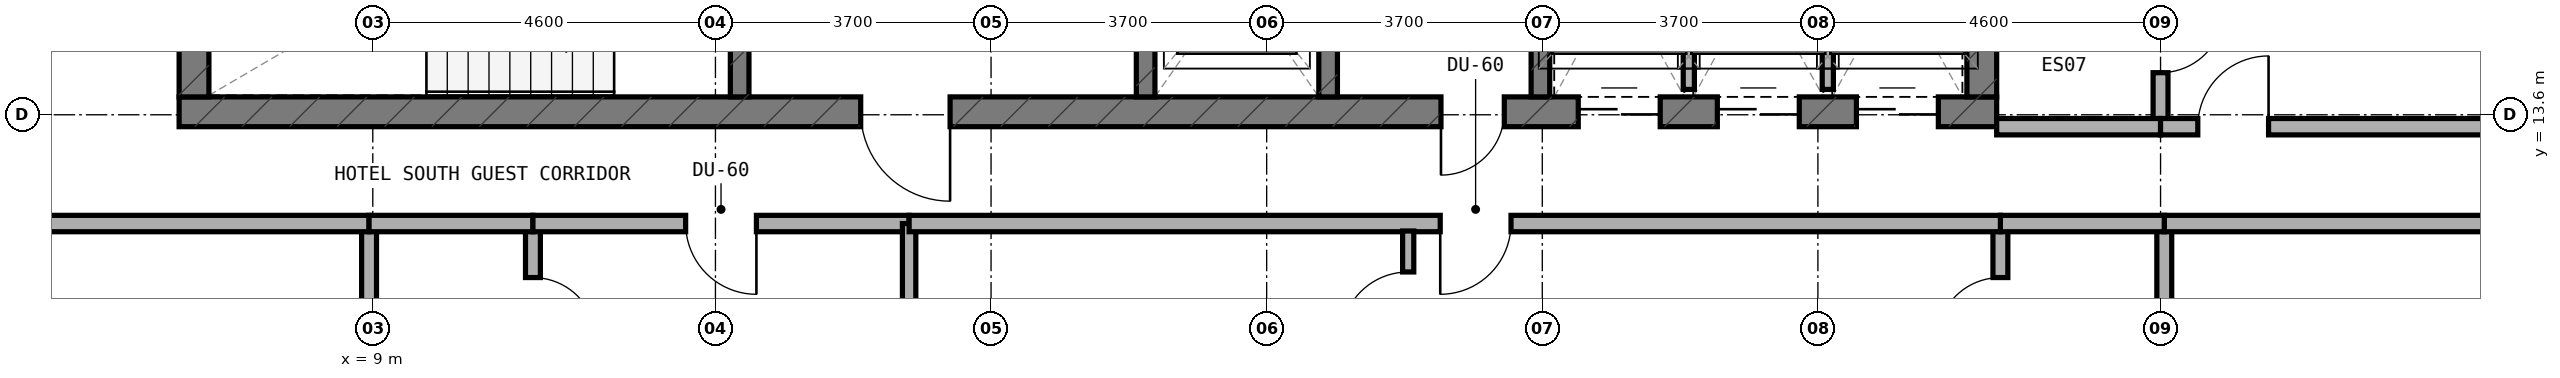
"""IFC4 building model, lengths in metres.
Left out: names, types, materials, properties, quantities, classifications, styles, units other than length and angle.
Written with IfcOpenShell. Run it as: python <this file> out.ifc"""

import sys

from ifc_helpers import new_model, si_unit, direction, frame, frame_2d, origin, place, context, subcontext, project, spatial, rectangle, extrude, element, fill, save


model = new_model("IFC4")
c1 = context("Model", 3, precision=1e-05, world=origin(), true_north=direction((0.0, 1.0)))
c2 = subcontext(c1, "Body", "Model", "MODEL_VIEW")
j1 = project(units=[si_unit("LENGTHUNIT", "METRE"), si_unit("PLANEANGLEUNIT", "RADIAN")], contexts=[c1])
p1 = place(None, origin())
s1 = spatial("IfcSite", under=j1, at=p1, CompositionType="ELEMENT")
p2 = place(p1, origin())
s2 = spatial("IfcBuilding", under=s1, at=p2, CompositionType="ELEMENT")
p3 = place(p2, frame((0.0, 0.0, 243.2)))
s3 = spatial("IfcBuildingStorey", under=s2, at=p3, CompositionType="ELEMENT", Elevation=243.2)
p4 = place(p3, frame((6.4, 13.64, 0.0), z_axis=(0.0, 0.0, 1.0), x_axis=(1.0, 0.0, 0.0)))
e1 = element("IfcWall", 1, at=p4, inside=s3, PredefinedType="SHEAR", context=c2, shape_type="SweptSolid", body=[
    extrude(rectangle(XDim=24.4, YDim=0.4, at=frame_2d((12.2, 0.0))), origin(), (0.0, 0.0, 1.0), 3.6),
])
p5 = place(p4, frame((9.15, 0.0, 0.0)))
e2 = element("IfcOpeningElement", 2, at=p5, cuts=e1, PredefinedType="OPENING", context=c2, shape_type="SweptSolid", body=[
    extrude(rectangle(XDim=1.2, YDim=2.15, at=frame_2d((0.6, 1.075))), frame((0.0, 0.21, 0.0), z_axis=(0.0, -1.0, 0.0), x_axis=(1.0, 0.0, 0.0)), (0.0, 0.0, 1.0), 0.42),
])
p6 = place(p4, frame((16.94, 0.0, 0.0)))
e3 = element("IfcOpeningElement", 3, at=p6, cuts=e1, PredefinedType="OPENING", context=c2, shape_type="SweptSolid", body=[
    extrude(rectangle(XDim=0.85, YDim=2.1, at=frame_2d((0.425, 1.05))), frame((0.0, 0.21, 0.0), z_axis=(0.0, -1.0, 0.0), x_axis=(1.0, 0.0, 0.0)), (0.0, 0.0, 1.0), 0.42),
])
p7 = place(p4, frame((18.783, 0.0, 0.0)))
e4 = element("IfcOpeningElement", 4, at=p7, cuts=e1, PredefinedType="OPENING", context=c2, shape_type="SweptSolid", body=[
    extrude(rectangle(XDim=1.1, YDim=2.15, at=frame_2d((0.55, 1.075))), frame((0.0, 0.21, 0.0), z_axis=(0.0, -1.0, 0.0), x_axis=(1.0, 0.0, 0.0)), (0.0, 0.0, 1.0), 0.42),
])
p8 = place(p4, frame((20.65, 0.0, 0.0)))
e5 = element("IfcOpeningElement", 5, at=p8, cuts=e1, PredefinedType="OPENING", context=c2, shape_type="SweptSolid", body=[
    extrude(rectangle(XDim=1.1, YDim=2.15, at=frame_2d((0.55, 1.075))), frame((0.0, 0.21, 0.0), z_axis=(0.0, -1.0, 0.0), x_axis=(1.0, 0.0, 0.0)), (0.0, 0.0, 1.0), 0.42),
])
p9 = place(p4, frame((22.517, 0.0, 0.0)))
e6 = element("IfcOpeningElement", 6, at=p9, cuts=e1, PredefinedType="OPENING", context=c2, shape_type="SweptSolid", body=[
    extrude(rectangle(XDim=1.1, YDim=2.15, at=frame_2d((0.55, 1.075))), frame((0.0, 0.21, 0.0), z_axis=(0.0, -1.0, 0.0), x_axis=(1.0, 0.0, 0.0)), (0.0, 0.0, 1.0), 0.42),
])
for number, where, z_axis, x_axis in (
    (7, (6.6, 13.84, 0.0), (0.0, 0.0, 1.0), (0.0, 1.0, 0.0)),
    (8, (30.6, 13.84, 0.0), (0.0, 0.0, 1.0), (0.0, 1.0, 0.0)),
):
    element("IfcWall", number, at=place(p3, frame(where, z_axis=z_axis, x_axis=x_axis)), inside=s3, PredefinedType="SHEAR", context=c2, shape_type="SweptSolid", body=[
        extrude(rectangle(XDim=3.16, YDim=0.4, at=frame_2d((1.58, 0.0))), origin(), (0.0, 0.0, 1.0), 3.6),
    ])
p10 = place(p3, frame((13.925, 13.84, 0.0), z_axis=(0.0, 0.0, 1.0), x_axis=(0.0, 1.0, 0.0)))
e9 = element("IfcWall", 9, at=p10, inside=s3, PredefinedType="STANDARD", context=c2, shape_type="SweptSolid", body=[
    extrude(rectangle(XDim=3.16, YDim=0.25, at=frame_2d((1.58, 0.0))), origin(), (0.0, 0.0, 1.0), 3.32),
])
p11 = place(p10, frame((0.98, 0.0, 0.0)))
e10 = element("IfcOpeningElement", 10, at=p11, cuts=e9, PredefinedType="OPENING", context=c2, shape_type="SweptSolid", body=[
    extrude(rectangle(XDim=1.1, YDim=2.15, at=frame_2d((0.55, 1.075))), frame((0.0, 0.135, 0.0), z_axis=(0.0, -1.0, 0.0), x_axis=(1.0, 0.0, 0.0)), (0.0, 0.0, 1.0), 0.27),
])
p12 = place(p3, frame((19.375, 13.84, 0.0), z_axis=(0.0, 0.0, 1.0), x_axis=(0.0, 1.0, 0.0)))
e11 = element("IfcWall", 11, at=p12, inside=s3, PredefinedType="STANDARD", context=c2, shape_type="SweptSolid", body=[
    extrude(rectangle(XDim=3.16, YDim=0.25, at=frame_2d((1.58, 0.0))), origin(), (0.0, 0.0, 1.0), 3.32),
])
p13 = place(p12, frame((0.98, 0.0, 0.0)))
e12 = element("IfcOpeningElement", 12, at=p13, cuts=e11, PredefinedType="OPENING", context=c2, shape_type="SweptSolid", body=[
    extrude(rectangle(XDim=1.1, YDim=2.15, at=frame_2d((0.55, 1.075))), frame((0.0, 0.135, 0.0), z_axis=(0.0, -1.0, 0.0), x_axis=(1.0, 0.0, 0.0)), (0.0, 0.0, 1.0), 0.27),
])
for number, where, z_axis, x_axis in (
    (13, (21.825, 13.84, 0.0), (0.0, 0.0, 1.0), (0.0, 1.0, 0.0)),
    (14, (24.675, 13.84, 0.0), (0.0, 0.0, 1.0), (0.0, 1.0, 0.0)),
):
    element("IfcWall", number, at=place(p3, frame(where, z_axis=z_axis, x_axis=x_axis)), inside=s3, PredefinedType="STANDARD", context=c2, shape_type="SweptSolid", body=[
        extrude(rectangle(XDim=3.16, YDim=0.25, at=frame_2d((1.58, 0.0))), origin(), (0.0, 0.0, 1.0), 3.32),
    ])
p14 = place(p3, frame((26.667, 13.94, 0.0), z_axis=(0.0, 0.0, 1.0), x_axis=(0.0, 1.0, 0.0)))
e15 = element("IfcWall", 15, at=p14, inside=s3, PredefinedType="PARTITIONING", context=c2, shape_type="SweptSolid", body=[
    extrude(rectangle(XDim=2.96, YDim=0.15, at=frame_2d((1.48, 0.0))), origin(), (0.0, 0.0, 1.0), 3.32),
])
p15 = place(p3, frame((28.533, 13.94, 0.0), z_axis=(0.0, 0.0, 1.0), x_axis=(0.0, 1.0, 0.0)))
e16 = element("IfcWall", 16, at=p15, inside=s3, PredefinedType="PARTITIONING", context=c2, shape_type="SweptSolid", body=[
    extrude(rectangle(XDim=2.96, YDim=0.15, at=frame_2d((1.48, 0.0))), origin(), (0.0, 0.0, 1.0), 2.745),
])
p16 = place(p3, frame((11.15, 9.94, 0.0), z_axis=(0.0, 0.0, 1.0), x_axis=(0.0, 1.0, 0.0)))
e17 = element("IfcWall", 17, at=p16, inside=s3, PredefinedType="PLUMBINGWALL", context=c2, shape_type="SweptSolid", body=[
    extrude(rectangle(XDim=2.1, YDim=0.2, at=frame_2d((1.05, 0.0))), origin(), (0.0, 0.0, 1.0), 2.995),
])
p17 = place(p16, frame((0.625, 0.0, 0.0)))
e18 = element("IfcOpeningElement", 18, at=p17, cuts=e17, PredefinedType="OPENING", context=c2, shape_type="SweptSolid", body=[
    extrude(rectangle(XDim=0.85, YDim=2.1, at=frame_2d((0.425, 1.05))), frame((0.0, 0.11, 0.0), z_axis=(0.0, -1.0, 0.0), x_axis=(1.0, 0.0, 0.0)), (0.0, 0.0, 1.0), 0.22),
])
p18 = place(p3, frame((8.95, 9.94, 0.0), z_axis=(0.0, 0.0, 1.0), x_axis=(0.0, 1.0, 0.0)))
e19 = element("IfcWall", 19, at=p18, inside=s3, PredefinedType="PLUMBINGWALL", context=c2, shape_type="SweptSolid", body=[
    extrude(rectangle(XDim=2.1, YDim=0.2, at=frame_2d((1.05, 0.0))), origin(), (0.0, 0.0, 1.0), 2.995),
])
p19 = place(p3, frame((2.76, 12.14, 0.0), z_axis=(0.0, 0.0, 1.0), x_axis=(1.0, 0.0, 0.0)))
e20 = element("IfcWall", 20, at=p19, inside=s3, PredefinedType="SOLIDWALL", context=c2, shape_type="SweptSolid", body=[
    extrude(rectangle(XDim=6.19, YDim=0.22, at=frame_2d((3.095, 0.0))), origin(), (0.0, 0.0, 1.0), 2.745),
])
p20 = place(p3, frame((8.95, 12.14, 0.0), z_axis=(0.0, 0.0, 1.0), x_axis=(1.0, 0.0, 0.0)))
e21 = element("IfcWall", 21, at=p20, inside=s3, PredefinedType="SOLIDWALL", context=c2, shape_type="SweptSolid", body=[
    extrude(rectangle(XDim=2.2, YDim=0.22, at=frame_2d((1.1, 0.0))), origin(), (0.0, 0.0, 1.0), 3.32),
])
p21 = place(p3, frame((11.15, 12.14, 0.0), z_axis=(0.0, 0.0, 1.0), x_axis=(1.0, 0.0, 0.0)))
e22 = element("IfcWall", 22, at=p21, inside=s3, PredefinedType="SOLIDWALL", context=c2, shape_type="SweptSolid", body=[
    extrude(rectangle(XDim=5.05, YDim=0.22, at=frame_2d((2.525, 0.0))), origin(), (0.0, 0.0, 1.0), 2.745),
])
p22 = place(p21, frame((2.05, 0.0, 0.0)))
e23 = element("IfcOpeningElement", 23, at=p22, cuts=e22, PredefinedType="OPENING", context=c2, shape_type="SweptSolid", body=[
    extrude(rectangle(XDim=0.95, YDim=2.1, at=frame_2d((0.475, 1.05))), frame((0.0, 0.12, 0.0), z_axis=(0.0, -1.0, 0.0), x_axis=(1.0, 0.0, 0.0)), (0.0, 0.0, 1.0), 0.24),
])
p23 = place(p3, frame((16.2, 6.46, 0.0), z_axis=(0.0, 0.0, 1.0), x_axis=(0.0, 1.0, 0.0)))
e24 = element("IfcWall", 24, at=p23, inside=s3, PredefinedType="SOLIDWALL", context=c2, shape_type="SweptSolid", body=[
    extrude(rectangle(XDim=5.68, YDim=0.18, at=frame_2d((2.84, 0.0))), origin(), (0.0, 0.0, 1.0), 2.745),
])
p24 = place(p3, frame((30.85, 9.94, 0.0), z_axis=(0.0, 0.0, 1.0), x_axis=(0.0, 1.0, 0.0)))
e25 = element("IfcWall", 25, at=p24, inside=s3, PredefinedType="PLUMBINGWALL", context=c2, shape_type="SweptSolid", body=[
    extrude(rectangle(XDim=2.1, YDim=0.2, at=frame_2d((1.05, 0.0))), origin(), (0.0, 0.0, 1.0), 2.995),
])
p25 = place(p24, frame((0.625, 0.0, 0.0)))
e26 = element("IfcOpeningElement", 26, at=p25, cuts=e25, PredefinedType="OPENING", context=c2, shape_type="SweptSolid", body=[
    extrude(rectangle(XDim=0.85, YDim=2.1, at=frame_2d((0.425, 1.05))), frame((0.0, 0.11, 0.0), z_axis=(0.0, -1.0, 0.0), x_axis=(1.0, 0.0, 0.0)), (0.0, 0.0, 1.0), 0.22),
])
p26 = place(p3, frame((33.05, 9.94, 0.0), z_axis=(0.0, 0.0, 1.0), x_axis=(0.0, 1.0, 0.0)))
e27 = element("IfcWall", 27, at=p26, inside=s3, PredefinedType="PLUMBINGWALL", context=c2, shape_type="SweptSolid", body=[
    extrude(rectangle(XDim=2.1, YDim=0.2, at=frame_2d((1.05, 0.0))), origin(), (0.0, 0.0, 1.0), 2.995),
])
p27 = place(p3, frame((33.05, 12.14, 0.0), z_axis=(0.0, 0.0, 1.0), x_axis=(1.0, 0.0, 0.0)))
e28 = element("IfcWall", 28, at=p27, inside=s3, PredefinedType="SOLIDWALL", context=c2, shape_type="SweptSolid", body=[
    extrude(rectangle(XDim=6.19, YDim=0.22, at=frame_2d((3.095, 0.0))), origin(), (0.0, 0.0, 1.0), 2.745),
])
p28 = place(p3, frame((30.85, 12.14, 0.0), z_axis=(0.0, 0.0, 1.0), x_axis=(1.0, 0.0, 0.0)))
e29 = element("IfcWall", 29, at=p28, inside=s3, PredefinedType="SOLIDWALL", context=c2, shape_type="SweptSolid", body=[
    extrude(rectangle(XDim=2.2, YDim=0.22, at=frame_2d((1.1, 0.0))), origin(), (0.0, 0.0, 1.0), 3.32),
])
p29 = place(p3, frame((16.2, 12.14, 0.0), z_axis=(0.0, 0.0, 1.0), x_axis=(1.0, 0.0, 0.0)))
e30 = element("IfcWall", 30, at=p29, inside=s3, PredefinedType="SOLIDWALL", context=c2, shape_type="SweptSolid", body=[
    extrude(rectangle(XDim=14.65, YDim=0.22, at=frame_2d((7.325, 0.0))), origin(), (0.0, 0.0, 1.0), 2.745),
])
p30 = place(p29, frame((7.13, 0.0, 0.0)))
e31 = element("IfcOpeningElement", 31, at=p30, cuts=e30, PredefinedType="OPENING", context=c2, shape_type="SweptSolid", body=[
    extrude(rectangle(XDim=0.95, YDim=2.1, at=frame_2d((0.475, 1.05))), frame((0.0, 0.12, 0.0), z_axis=(0.0, -1.0, 0.0), x_axis=(1.0, 0.0, 0.0)), (0.0, 0.0, 1.0), 0.24),
])
p31 = place(p3, frame((22.9, 6.56, 0.0), z_axis=(0.0, 0.0, 1.0), x_axis=(0.0, 1.0, 0.0)))
e32 = element("IfcWall", 32, at=p31, inside=s3, PredefinedType="PARTITIONING", context=c2, shape_type="SweptSolid", body=[
    extrude(rectangle(XDim=5.48, YDim=0.15, at=frame_2d((2.74, 0.0))), origin(), (0.0, 0.0, 1.0), 2.995),
])
p32 = place(p31, frame((4.03, 0.0, 0.0)))
e33 = element("IfcOpeningElement", 33, at=p32, cuts=e32, PredefinedType="OPENING", context=c2, shape_type="SweptSolid", body=[
    extrude(rectangle(XDim=0.9, YDim=2.1, at=frame_2d((0.45, 1.05))), frame((0.0, 0.085, 0.0), z_axis=(0.0, -1.0, 0.0), x_axis=(1.0, 0.0, 0.0)), (0.0, 0.0, 1.0), 0.17),
])
p33 = place(p3, frame((33.0, 13.54, 0.0), z_axis=(0.0, 0.0, 1.0), x_axis=(0.0, 1.0, 0.0)))
e34 = element("IfcWall", 34, at=p33, inside=s3, PredefinedType="PLUMBINGWALL", context=c2, shape_type="SweptSolid", body=[
    extrude(rectangle(XDim=2.1, YDim=0.2, at=frame_2d((1.05, 0.0))), origin(), (0.0, 0.0, 1.0), 3.32),
])
p34 = place(p33, frame((0.625, 0.0, 0.0)))
e35 = element("IfcOpeningElement", 35, at=p34, cuts=e34, PredefinedType="OPENING", context=c2, shape_type="SweptSolid", body=[
    extrude(rectangle(XDim=0.85, YDim=2.1, at=frame_2d((0.425, 1.05))), frame((0.0, 0.11, 0.0), z_axis=(0.0, -1.0, 0.0), x_axis=(1.0, 0.0, 0.0)), (0.0, 0.0, 1.0), 0.22),
])
p35 = place(p3, frame((30.8, 13.44, 0.0), z_axis=(0.0, 0.0, 1.0), x_axis=(1.0, 0.0, 0.0)))
e36 = element("IfcWall", 36, at=p35, inside=s3, PredefinedType="SOLIDWALL", context=c2, shape_type="SweptSolid", body=[
    extrude(rectangle(XDim=2.2, YDim=0.22, at=frame_2d((1.1, 0.0))), origin(), (0.0, 0.0, 1.0), 3.32),
])
p36 = place(p3, frame((33.0, 13.44, 0.0), z_axis=(0.0, 0.0, 1.0), x_axis=(1.0, 0.0, 0.0)))
e37 = element("IfcWall", 37, at=p36, inside=s3, PredefinedType="SOLIDWALL", context=c2, shape_type="SweptSolid", body=[
    extrude(rectangle(XDim=6.4, YDim=0.22, at=frame_2d((3.2, 0.0))), origin(), (0.0, 0.0, 1.0), 2.745),
])
p37 = place(p36, frame((0.5, 0.0, 0.0)))
e38 = element("IfcOpeningElement", 38, at=p37, cuts=e37, PredefinedType="OPENING", context=c2, shape_type="SweptSolid", body=[
    extrude(rectangle(XDim=0.95, YDim=2.1, at=frame_2d((0.475, 1.05))), frame((0.0, 0.12, 0.0), z_axis=(0.0, -1.0, 0.0), x_axis=(1.0, 0.0, 0.0)), (0.0, 0.0, 1.0), 0.24),
])
p38 = place(p5, frame((1.2, 0.0, 0.0), z_axis=(0.0, 0.0, 1.0), x_axis=(-1.0, 0.0, 0.0)))
e39 = element("IfcDoor", 39, at=p38, inside=s3, OperationType="SINGLE_SWING_LEFT", PredefinedType="DOOR", context=c2, shape_type="SweptSolid", body=[
    extrude(rectangle(XDim=1.2, YDim=2.15, at=frame_2d((0.6, 1.075))), frame((0.0, 0.025, 0.0), z_axis=(0.0, -1.0, 0.0), x_axis=(1.0, 0.0, 0.0)), (0.0, 0.0, 1.0), 0.05),
])
fill(e2, e39)
p39 = place(p6, frame((0.85, 0.0, 0.0), z_axis=(0.0, 0.0, 1.0), x_axis=(-1.0, 0.0, 0.0)))
e40 = element("IfcDoor", 40, at=p39, inside=s3, OperationType="SINGLE_SWING_RIGHT", PredefinedType="DOOR", context=c2, shape_type="SweptSolid", body=[
    extrude(rectangle(XDim=0.85, YDim=2.1, at=frame_2d((0.425, 1.05))), frame((0.0, 0.025, 0.0), z_axis=(0.0, -1.0, 0.0), x_axis=(1.0, 0.0, 0.0)), (0.0, 0.0, 1.0), 0.05),
])
fill(e3, e40)
p40 = place(p7, frame((1.1, 0.0, 0.0), z_axis=(0.0, 0.0, 1.0), x_axis=(-1.0, 0.0, 0.0)))
e41 = element("IfcDoor", 41, at=p40, inside=s3, OperationType="DOUBLE_DOOR_SLIDING", PredefinedType="DOOR", context=c2, shape_type="SweptSolid", body=[
    extrude(rectangle(XDim=1.1, YDim=2.15, at=frame_2d((0.55, 1.075))), frame((0.0, 0.025, 0.0), z_axis=(0.0, -1.0, 0.0), x_axis=(1.0, 0.0, 0.0)), (0.0, 0.0, 1.0), 0.05),
])
fill(e4, e41)
p41 = place(p8, frame((1.1, 0.0, 0.0), z_axis=(0.0, 0.0, 1.0), x_axis=(-1.0, 0.0, 0.0)))
e42 = element("IfcDoor", 42, at=p41, inside=s3, OperationType="DOUBLE_DOOR_SLIDING", PredefinedType="DOOR", context=c2, shape_type="SweptSolid", body=[
    extrude(rectangle(XDim=1.1, YDim=2.15, at=frame_2d((0.55, 1.075))), frame((0.0, 0.025, 0.0), z_axis=(0.0, -1.0, 0.0), x_axis=(1.0, 0.0, 0.0)), (0.0, 0.0, 1.0), 0.05),
])
fill(e5, e42)
p42 = place(p9, frame((1.1, 0.0, 0.0), z_axis=(0.0, 0.0, 1.0), x_axis=(-1.0, 0.0, 0.0)))
e43 = element("IfcDoor", 43, at=p42, inside=s3, OperationType="DOUBLE_DOOR_SLIDING", PredefinedType="DOOR", context=c2, shape_type="SweptSolid", body=[
    extrude(rectangle(XDim=1.1, YDim=2.15, at=frame_2d((0.55, 1.075))), frame((0.0, 0.025, 0.0), z_axis=(0.0, -1.0, 0.0), x_axis=(1.0, 0.0, 0.0)), (0.0, 0.0, 1.0), 0.05),
])
fill(e6, e43)
p43 = place(p17, frame((0.85, 0.0, 0.0), z_axis=(0.0, 0.0, 1.0), x_axis=(-1.0, 0.0, 0.0)))
e44 = element("IfcDoor", 44, at=p43, inside=s3, OperationType="SINGLE_SWING_RIGHT", PredefinedType="DOOR", context=c2, shape_type="SweptSolid", body=[
    extrude(rectangle(XDim=0.85, YDim=2.1, at=frame_2d((0.425, 1.05))), frame((0.0, 0.025, 0.0), z_axis=(0.0, -1.0, 0.0), x_axis=(1.0, 0.0, 0.0)), (0.0, 0.0, 1.0), 0.05),
])
fill(e18, e44)
p44 = place(p22, frame((0.95, 0.0, 0.0), z_axis=(0.0, 0.0, 1.0), x_axis=(-1.0, 0.0, 0.0)))
e45 = element("IfcDoor", 45, at=p44, inside=s3, OperationType="SINGLE_SWING_LEFT", PredefinedType="DOOR", context=c2, shape_type="SweptSolid", body=[
    extrude(rectangle(XDim=0.95, YDim=2.1, at=frame_2d((0.475, 1.05))), frame((0.0, 0.025, 0.0), z_axis=(0.0, -1.0, 0.0), x_axis=(1.0, 0.0, 0.0)), (0.0, 0.0, 1.0), 0.05),
])
fill(e23, e45)
p45 = place(p25, origin())
e46 = element("IfcDoor", 46, at=p45, inside=s3, OperationType="SINGLE_SWING_LEFT", PredefinedType="DOOR", context=c2, shape_type="SweptSolid", body=[
    extrude(rectangle(XDim=0.85, YDim=2.1, at=frame_2d((0.425, 1.05))), frame((0.0, 0.025, 0.0), z_axis=(0.0, -1.0, 0.0), x_axis=(1.0, 0.0, 0.0)), (0.0, 0.0, 1.0), 0.05),
])
fill(e26, e46)
p46 = place(p30, frame((0.95, 0.0, 0.0), z_axis=(0.0, 0.0, 1.0), x_axis=(-1.0, 0.0, 0.0)))
e47 = element("IfcDoor", 47, at=p46, inside=s3, OperationType="SINGLE_SWING_RIGHT", PredefinedType="DOOR", context=c2, shape_type="SweptSolid", body=[
    extrude(rectangle(XDim=0.95, YDim=2.1, at=frame_2d((0.475, 1.05))), frame((0.0, 0.025, 0.0), z_axis=(0.0, -1.0, 0.0), x_axis=(1.0, 0.0, 0.0)), (0.0, 0.0, 1.0), 0.05),
])
fill(e31, e47)
p47 = place(p32, origin())
e48 = element("IfcDoor", 48, at=p47, inside=s3, OperationType="SINGLE_SWING_LEFT", PredefinedType="DOOR", context=c2, shape_type="SweptSolid", body=[
    extrude(rectangle(XDim=0.9, YDim=2.1, at=frame_2d((0.45, 1.05))), frame((0.0, 0.025, 0.0), z_axis=(0.0, -1.0, 0.0), x_axis=(1.0, 0.0, 0.0)), (0.0, 0.0, 1.0), 0.05),
])
fill(e33, e48)
p48 = place(p34, frame((0.85, 0.0, 0.0), z_axis=(0.0, 0.0, 1.0), x_axis=(-1.0, 0.0, 0.0)))
e49 = element("IfcDoor", 49, at=p48, inside=s3, OperationType="SINGLE_SWING_LEFT", PredefinedType="DOOR", context=c2, shape_type="SweptSolid", body=[
    extrude(rectangle(XDim=0.85, YDim=2.1, at=frame_2d((0.425, 1.05))), frame((0.0, 0.025, 0.0), z_axis=(0.0, -1.0, 0.0), x_axis=(1.0, 0.0, 0.0)), (0.0, 0.0, 1.0), 0.05),
])
fill(e35, e49)
p49 = place(p37, origin())
e50 = element("IfcDoor", 50, at=p49, inside=s3, OperationType="SINGLE_SWING_RIGHT", PredefinedType="DOOR", context=c2, shape_type="SweptSolid", body=[
    extrude(rectangle(XDim=0.95, YDim=2.1, at=frame_2d((0.475, 1.05))), frame((0.0, 0.025, 0.0), z_axis=(0.0, -1.0, 0.0), x_axis=(1.0, 0.0, 0.0)), (0.0, 0.0, 1.0), 0.05),
])
fill(e38, e50)
save(model, sys.argv[1])
